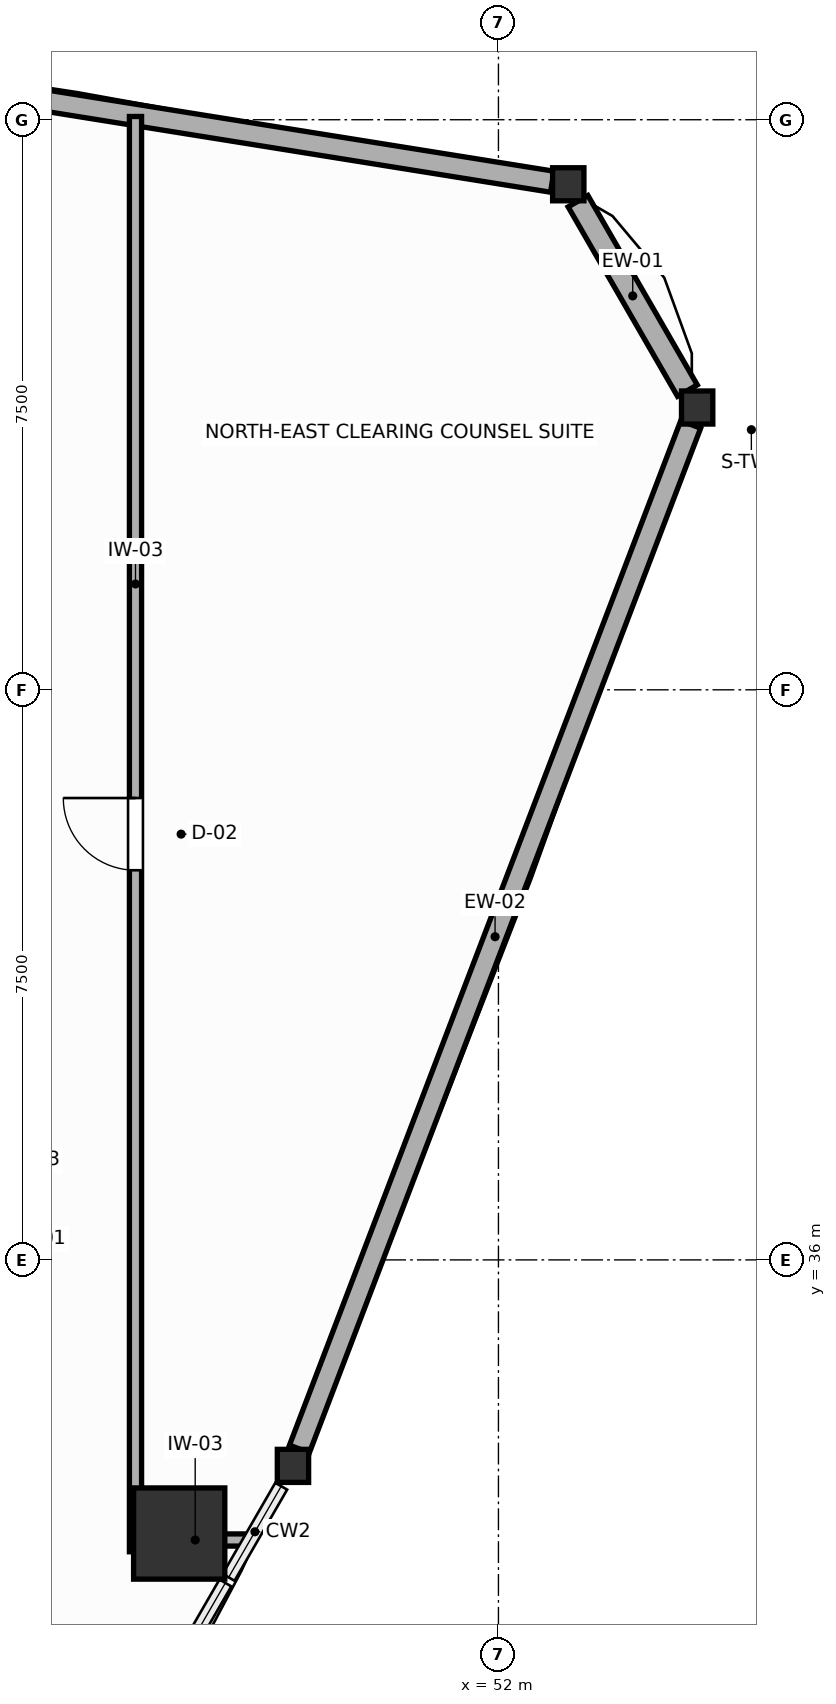
"""IFC4 building model, lengths in metres.
Left out: names, types, materials, properties, quantities, classifications, styles, units other than length and angle.
Written with IfcOpenShell. Run it as: python <this file> out.ifc"""

import sys

from ifc_helpers import new_model, si_unit, direction, frame, frame_2d, origin, origin_2d, place, context, subcontext, project, spatial, rectangle, i_section, extrude, source, transform, mapped, element, fill, save


model = new_model("IFC4")
c1 = context("Model", 3, precision=1e-05, world=origin(), true_north=direction((0.0, 1.0)))
c2 = subcontext(c1, "Body", "Model", "MODEL_VIEW")
j1 = project(units=[si_unit("LENGTHUNIT", "METRE"), si_unit("PLANEANGLEUNIT", "RADIAN")], contexts=[c1])
p1 = place(None, origin())
s1 = spatial("IfcSite", under=j1, at=p1, CompositionType="ELEMENT")
p2 = place(p1, origin())
s2 = spatial("IfcBuilding", under=s1, at=p2, CompositionType="ELEMENT")
p3 = place(p2, frame((0.0, 0.0, 165.0)))
s3 = spatial("IfcBuildingStorey", under=s2, at=p3, CompositionType="ELEMENT", Elevation=165.0)
m1 = source(origin(), c2, "Body", "SweptSolid", [
    extrude(rectangle(XDim=1.2, YDim=1.2, at=origin_2d()), origin(), (0.0, 0.0, 1.0), 3.6),
])
p4 = place(p3, frame((47.8, 32.4, 0.0), z_axis=(0.0, 0.0, 1.0), x_axis=(1.0, 0.0, 0.0)))
e1 = element("IfcColumn", 1, at=p4, inside=s3, PredefinedType="COLUMN", context=c2, shape_type="MappedRepresentation", body=[
    mapped(m1, transform((0.0, 0.0, 0.0), scale=1.0)),
])
m2 = source(origin(), c2, "Body", "SweptSolid", [
    extrude(i_section(OverallWidth=0.412, OverallDepth=0.435, WebThickness=0.033, FlangeThickness=0.053, FilletRadius=0.015, at=origin_2d()), origin(), (0.0, 0.0, 1.0), 3.6),
])
for number, where, z_axis, x_axis in (
    (2, (54.614, 47.214, 0.0), (0.0, 0.0, 1.0), (1.0, 0.0, 0.0)),
    (3, (52.919, 50.151, 0.0), (0.0, 0.0, 1.0), (1.0, 0.0, 0.0)),
    (4, (49.297, 33.29, 0.0), (0.0, 0.0, 1.0), (1.0, 0.0, 0.0)),
):
    element("IfcColumn", number, at=place(p3, frame(where, z_axis=z_axis, x_axis=x_axis)), inside=s3, PredefinedType="COLUMN", context=c2, shape_type="MappedRepresentation", body=[
        mapped(m2, transform((0.0, 0.0, 0.0), scale=1.0)),
    ])
p5 = place(p3, frame((54.486, 47.436, 0.0), z_axis=(0.0, 0.0, 1.0), x_axis=(-0.499962359318, 0.866047134552, 0.0)))
e5 = element("IfcWall", 5, at=p5, inside=s3, PredefinedType="SOLIDWALL", context=c2, shape_type="SweptSolid", body=[
    extrude(rectangle(XDim=2.878, YDim=0.3, at=frame_2d((1.439, 0.0))), origin(), (0.0, 0.0, 1.0), 1.84),
])
p6 = place(p3, frame((52.708, 50.185, 0.0), z_axis=(0.0, 0.0, 1.0), x_axis=(-0.98742305143, 0.158100339991, 0.0)))
e6 = element("IfcWall", 6, at=p6, inside=s3, PredefinedType="SOLIDWALL", context=c2, shape_type="SweptSolid", body=[
    extrude(rectangle(XDim=14.477, YDim=0.28, at=frame_2d((7.239, 0.0))), origin(), (0.0, 0.0, 1.0), 1.84),
])
p7 = place(p3, frame((49.382, 33.513, 0.0), z_axis=(0.0, 0.0, 1.0), x_axis=(0.356778358033, 0.934189061828, 0.0)))
e7 = element("IfcWall", 7, at=p7, inside=s3, PredefinedType="SOLIDWALL", context=c2, shape_type="SweptSolid", body=[
    extrude(rectangle(XDim=14.428, YDim=0.28, at=frame_2d((7.214, 0.0))), origin(), (0.0, 0.0, 1.0), 1.84),
])
p8 = place(p3, frame((47.225, 32.16, 0.0), z_axis=(0.0, 0.0, 1.0), x_axis=(0.0, 1.0, 0.0)))
e8 = element("IfcWall", 8, at=p8, inside=s3, PredefinedType="PARTITIONING", context=c2, shape_type="SweptSolid", body=[
    extrude(rectangle(XDim=18.883, YDim=0.16, at=frame_2d((9.441, 0.0))), origin(), (0.0, 0.0, 1.0), 3.4),
])
p9 = place(p8, frame((8.966, 0.0, 0.0)))
e9 = element("IfcOpeningElement", 9, at=p9, cuts=e8, PredefinedType="OPENING", context=c2, shape_type="SweptSolid", body=[
    extrude(rectangle(XDim=0.95, YDim=2.05, at=frame_2d((0.475, 1.025))), frame((0.0, 0.09, 0.0), z_axis=(0.0, -1.0, 0.0), x_axis=(1.0, 0.0, 0.0)), (0.0, 0.0, 1.0), 0.18),
])
p10 = place(p3, frame((47.307, 32.315, 0.0), z_axis=(0.0, 0.0, 1.0), x_axis=(1.0, 0.0, 0.0)))
e10 = element("IfcWall", 10, at=p10, inside=s3, PredefinedType="PARTITIONING", context=c2, shape_type="SweptSolid", body=[
    extrude(rectangle(XDim=1.407, YDim=0.16, at=frame_2d((0.703, 0.0))), origin(), (0.0, 0.0, 1.0), 2.13),
])
p11 = place(p9, origin())
e11 = element("IfcDoor", 11, at=p11, inside=s3, OperationType="SINGLE_SWING_RIGHT", PredefinedType="DOOR", context=c2, shape_type="SweptSolid", body=[
    extrude(rectangle(XDim=0.95, YDim=2.05, at=frame_2d((0.475, 1.025))), frame((0.0, 0.025, 0.0), z_axis=(0.0, -1.0, 0.0), x_axis=(1.0, 0.0, 0.0)), (0.0, 0.0, 1.0), 0.05),
])
fill(e9, e11)
save(model, sys.argv[1])
